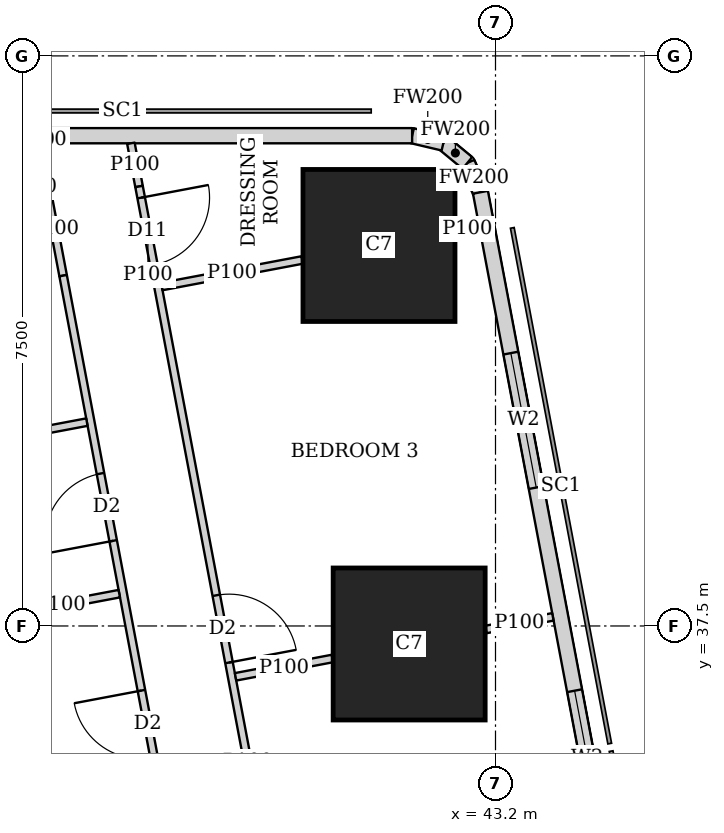
"""IFC4 building model, lengths in metres.
Left out: names, types, materials, properties, quantities, classifications, styles, units other than length and angle.
Written with IfcOpenShell. Run it as: python <this file> out.ifc"""

import sys

from ifc_helpers import new_model, si_unit, direction, frame, frame_2d, origin, origin_2d, place, context, subcontext, project, spatial, rectangle, extrude, element, fill, save


model = new_model("IFC4")
c1 = context("Model", 3, precision=1e-05, world=origin(), true_north=direction((0.0, 1.0)))
c2 = subcontext(c1, "Body", "Model", "MODEL_VIEW")
j1 = project(units=[si_unit("LENGTHUNIT", "METRE"), si_unit("PLANEANGLEUNIT", "RADIAN")], contexts=[c1])
p1 = place(None, origin())
s1 = spatial("IfcSite", under=j1, at=p1, CompositionType="ELEMENT")
p2 = place(p1, origin())
s2 = spatial("IfcBuilding", under=s1, at=p2, CompositionType="ELEMENT")
p3 = place(p2, frame((0.0, 0.0, 266.6)))
s3 = spatial("IfcBuildingStorey", under=s2, at=p3, CompositionType="ELEMENT", Elevation=266.6)
for number, where, z_axis, x_axis in (
    (1, (42.064, 37.263, 0.0), (0.0, 0.0, 1.0), (1.0, 0.0, 0.0)),
    (2, (41.667, 42.506, 0.0), (0.0, 0.0, 1.0), (1.0, 0.0, 0.0)),
):
    element("IfcColumn", number, at=place(p3, frame(where, z_axis=z_axis, x_axis=x_axis)), inside=s3, PredefinedType="COLUMN", context=c2, shape_type="SweptSolid", body=[
        extrude(rectangle(XDim=2.0, YDim=2.0, at=origin_2d()), origin(), (0.0, 0.0, 1.0), 3.75),
    ])
p4 = place(p3, frame((49.684, 7.832, 0.0), z_axis=(0.0, 0.0, 1.0), x_axis=(-0.185616669694, 0.982622232565, 0.0)))
e3 = element("IfcWall", 3, at=p4, inside=s3, PredefinedType="SOLIDWALL", context=c2, shape_type="SweptSolid", body=[
    extrude(rectangle(XDim=36.0, YDim=0.2, at=frame_2d((18.0, 0.0))), origin(), (0.0, 0.0, 1.0), 3.5),
])
p5 = place(p4, frame((2.518, 0.0, 0.9)))
e4 = element("IfcOpeningElement", 4, at=p5, cuts=e3, PredefinedType="OPENING", context=c2, shape_type="SweptSolid", body=[
    extrude(rectangle(XDim=2.4, YDim=1.5, at=frame_2d((1.2, 0.75))), frame((0.0, 0.11, 0.0), z_axis=(0.0, -1.0, 0.0), x_axis=(1.0, 0.0, 0.0)), (0.0, 0.0, 1.0), 0.22),
])
p6 = place(p4, frame((8.444, 0.0, 0.9)))
e5 = element("IfcOpeningElement", 5, at=p6, cuts=e3, PredefinedType="OPENING", context=c2, shape_type="SweptSolid", body=[
    extrude(rectangle(XDim=1.8, YDim=1.5, at=frame_2d((0.9, 0.75))), frame((0.0, 0.11, 0.0), z_axis=(0.0, -1.0, 0.0), x_axis=(1.0, 0.0, 0.0)), (0.0, 0.0, 1.0), 0.22),
])
p7 = place(p4, frame((12.261, 0.0, 0.9)))
e6 = element("IfcOpeningElement", 6, at=p7, cuts=e3, PredefinedType="OPENING", context=c2, shape_type="SweptSolid", body=[
    extrude(rectangle(XDim=1.8, YDim=1.5, at=frame_2d((0.9, 0.75))), frame((0.0, 0.11, 0.0), z_axis=(0.0, -1.0, 0.0), x_axis=(1.0, 0.0, 0.0)), (0.0, 0.0, 1.0), 0.22),
])
p8 = place(p4, frame((16.078, 0.0, 0.9)))
e7 = element("IfcOpeningElement", 7, at=p8, cuts=e3, PredefinedType="OPENING", context=c2, shape_type="SweptSolid", body=[
    extrude(rectangle(XDim=1.8, YDim=1.5, at=frame_2d((0.9, 0.75))), frame((0.0, 0.11, 0.0), z_axis=(0.0, -1.0, 0.0), x_axis=(1.0, 0.0, 0.0)), (0.0, 0.0, 1.0), 0.22),
])
p9 = place(p4, frame((19.894, 0.0, 0.9)))
e8 = element("IfcOpeningElement", 8, at=p9, cuts=e3, PredefinedType="OPENING", context=c2, shape_type="SweptSolid", body=[
    extrude(rectangle(XDim=1.8, YDim=1.5, at=frame_2d((0.9, 0.75))), frame((0.0, 0.11, 0.0), z_axis=(0.0, -1.0, 0.0), x_axis=(1.0, 0.0, 0.0)), (0.0, 0.0, 1.0), 0.22),
])
p10 = place(p4, frame((23.71, 0.0, 0.9)))
e9 = element("IfcOpeningElement", 9, at=p10, cuts=e3, PredefinedType="OPENING", context=c2, shape_type="SweptSolid", body=[
    extrude(rectangle(XDim=1.8, YDim=1.5, at=frame_2d((0.9, 0.75))), frame((0.0, 0.11, 0.0), z_axis=(0.0, -1.0, 0.0), x_axis=(1.0, 0.0, 0.0)), (0.0, 0.0, 1.0), 0.22),
])
p11 = place(p4, frame((27.526, 0.0, 0.9)))
e10 = element("IfcOpeningElement", 10, at=p11, cuts=e3, PredefinedType="OPENING", context=c2, shape_type="SweptSolid", body=[
    extrude(rectangle(XDim=1.8, YDim=1.5, at=frame_2d((0.9, 0.75))), frame((0.0, 0.11, 0.0), z_axis=(0.0, -1.0, 0.0), x_axis=(1.0, 0.0, 0.0)), (0.0, 0.0, 1.0), 0.22),
])
p12 = place(p4, frame((32.046, 0.0, 0.9)))
e11 = element("IfcOpeningElement", 11, at=p12, cuts=e3, PredefinedType="OPENING", context=c2, shape_type="SweptSolid", body=[
    extrude(rectangle(XDim=1.8, YDim=1.5, at=frame_2d((0.9, 0.75))), frame((0.0, 0.11, 0.0), z_axis=(0.0, -1.0, 0.0), x_axis=(1.0, 0.0, 0.0)), (0.0, 0.0, 1.0), 0.22),
])
p13 = place(p3, frame((43.002, 43.206, 0.0), z_axis=(0.0, 0.0, 1.0), x_axis=(-0.40678170573, 0.913525393124, 0.0)))
e12 = element("IfcWall", 12, at=p13, inside=s3, PredefinedType="SOLIDWALL", context=c2, shape_type="SweptSolid", body=[
    extrude(rectangle(XDim=0.423, YDim=0.2, at=frame_2d((0.211, 0.0))), origin(), (0.0, 0.0, 1.0), 3.5),
])
p14 = place(p3, frame((42.83, 43.592, 0.0), z_axis=(0.0, 0.0, 1.0), x_axis=(-0.771190539797, 0.636604391539, 0.0)))
e13 = element("IfcWall", 13, at=p14, inside=s3, PredefinedType="SOLIDWALL", context=c2, shape_type="SweptSolid", body=[
    extrude(rectangle(XDim=0.41, YDim=0.2, at=frame_2d((0.205, 0.0))), origin(), (0.0, 0.0, 1.0), 3.5),
])
p15 = place(p3, frame((42.514, 43.853, 0.0), z_axis=(0.0, 0.0, 1.0), x_axis=(-0.973288080424, 0.229587265555, 0.0)))
e14 = element("IfcWall", 14, at=p15, inside=s3, PredefinedType="SOLIDWALL", context=c2, shape_type="SweptSolid", body=[
    extrude(rectangle(XDim=0.422, YDim=0.2, at=frame_2d((0.211, 0.0))), origin(), (0.0, 0.0, 1.0), 3.5),
])
p16 = place(p3, frame((42.103, 43.95, 0.0), z_axis=(0.0, 0.0, 1.0), x_axis=(-1.0, 0.0, 0.0)))
e15 = element("IfcWall", 15, at=p16, inside=s3, PredefinedType="SOLIDWALL", context=c2, shape_type="SweptSolid", body=[
    extrude(rectangle(XDim=27.54, YDim=0.2, at=frame_2d((13.77, 0.0))), origin(), (0.0, 0.0, 1.0), 3.5),
])
p17 = place(p16, frame((10.603, 0.0, 0.9)))
e16 = element("IfcOpeningElement", 16, at=p17, cuts=e15, PredefinedType="OPENING", context=c2, shape_type="SweptSolid", body=[
    extrude(rectangle(XDim=1.8, YDim=1.5, at=frame_2d((0.9, 0.75))), frame((0.0, 0.11, 0.0), z_axis=(0.0, -1.0, 0.0), x_axis=(1.0, 0.0, 0.0)), (0.0, 0.0, 1.0), 0.22),
])
p18 = place(p16, frame((14.203, 0.0, 0.9)))
e17 = element("IfcOpeningElement", 17, at=p18, cuts=e15, PredefinedType="OPENING", context=c2, shape_type="SweptSolid", body=[
    extrude(rectangle(XDim=1.8, YDim=1.5, at=frame_2d((0.9, 0.75))), frame((0.0, 0.11, 0.0), z_axis=(0.0, -1.0, 0.0), x_axis=(1.0, 0.0, 0.0)), (0.0, 0.0, 1.0), 0.22),
])
p19 = place(p16, frame((17.803, 0.0, 0.9)))
e18 = element("IfcOpeningElement", 18, at=p19, cuts=e15, PredefinedType="OPENING", context=c2, shape_type="SweptSolid", body=[
    extrude(rectangle(XDim=1.8, YDim=1.5, at=frame_2d((0.9, 0.75))), frame((0.0, 0.11, 0.0), z_axis=(0.0, -1.0, 0.0), x_axis=(1.0, 0.0, 0.0)), (0.0, 0.0, 1.0), 0.22),
])
p20 = place(p16, frame((22.822, 0.0, 0.9)))
e19 = element("IfcOpeningElement", 19, at=p20, cuts=e15, PredefinedType="OPENING", context=c2, shape_type="SweptSolid", body=[
    extrude(rectangle(XDim=2.4, YDim=1.5, at=frame_2d((1.2, 0.75))), frame((0.0, 0.11, 0.0), z_axis=(0.0, -1.0, 0.0), x_axis=(1.0, 0.0, 0.0)), (0.0, 0.0, 1.0), 0.22),
])
p21 = place(p3, frame((34.036, 42.186, 0.0), z_axis=(0.0, 0.0, 1.0), x_axis=(0.185593518645, -0.9826266055, 0.0)))
e20 = element("IfcWall", 20, at=p21, inside=s3, PredefinedType="SOLIDWALL", context=c2, shape_type="SweptSolid", body=[
    extrude(rectangle(XDim=35.961, YDim=0.15, at=frame_2d((17.98, 0.0))), origin(), (0.0, 0.0, 1.0), 2.5),
])
p22 = place(p21, frame((15.529, 0.0, 0.0)))
e21 = element("IfcOpeningElement", 21, at=p22, cuts=e20, PredefinedType="OPENING", context=c2, shape_type="SweptSolid", body=[
    extrude(rectangle(XDim=1.0, YDim=2.1, at=frame_2d((0.5, 1.05))), frame((0.0, 0.085, 0.0), z_axis=(0.0, -1.0, 0.0), x_axis=(1.0, 0.0, 0.0)), (0.0, 0.0, 1.0), 0.17),
])
p23 = place(p21, frame((19.345, 0.0, 0.0)))
e22 = element("IfcOpeningElement", 22, at=p23, cuts=e20, PredefinedType="OPENING", context=c2, shape_type="SweptSolid", body=[
    extrude(rectangle(XDim=1.0, YDim=2.1, at=frame_2d((0.5, 1.05))), frame((0.0, 0.085, 0.0), z_axis=(0.0, -1.0, 0.0), x_axis=(1.0, 0.0, 0.0)), (0.0, 0.0, 1.0), 0.17),
])
p24 = place(p21, frame((30.594, 0.0, 0.0)))
e23 = element("IfcOpeningElement", 23, at=p24, cuts=e20, PredefinedType="OPENING", context=c2, shape_type="SweptSolid", body=[
    extrude(rectangle(XDim=1.0, YDim=2.1, at=frame_2d((0.5, 1.05))), frame((0.0, 0.085, 0.0), z_axis=(0.0, -1.0, 0.0), x_axis=(1.0, 0.0, 0.0)), (0.0, 0.0, 1.0), 0.17),
])
p25 = place(p3, frame((38.403, 43.85, 0.0), z_axis=(0.0, 0.0, 1.0), x_axis=(0.184976954078, -0.982742858768, 0.0)))
e24 = element("IfcWall", 24, at=p25, inside=s3, PredefinedType="PARTITIONING", context=c2, shape_type="SweptSolid", body=[
    extrude(rectangle(XDim=0.578, YDim=0.1, at=frame_2d((0.289, 0.0))), origin(), (0.0, 0.0, 1.0), 3.5),
])
p26 = place(p3, frame((38.51, 43.282, 0.0), z_axis=(0.0, 0.0, 1.0), x_axis=(0.185775287495, -0.982592256511, 0.0)))
e25 = element("IfcWall", 25, at=p26, inside=s3, PredefinedType="PARTITIONING", context=c2, shape_type="SweptSolid", body=[
    extrude(rectangle(XDim=1.259, YDim=0.1, at=frame_2d((0.629, 0.0))), origin(), (0.0, 0.0, 1.0), 2.05),
])
p27 = place(p26, frame((0.15, 0.0, 0.0)))
e26 = element("IfcOpeningElement", 26, at=p27, cuts=e25, PredefinedType="OPENING", context=c2, shape_type="SweptSolid", body=[
    extrude(rectangle(XDim=0.9, YDim=2.0, at=frame_2d((0.45, 1.0))), frame((0.0, 0.06, 0.0), z_axis=(0.0, -1.0, 0.0), x_axis=(1.0, 0.0, 0.0)), (0.0, 0.0, 1.0), 0.12),
])
p28 = place(p3, frame((38.744, 42.045, 0.0), z_axis=(0.0, 0.0, 1.0), x_axis=(0.185614085367, -0.982622720739, 0.0)))
e27 = element("IfcWall", 27, at=p28, inside=s3, PredefinedType="PARTITIONING", context=c2, shape_type="SweptSolid", body=[
    extrude(rectangle(XDim=12.898, YDim=0.1, at=frame_2d((6.449, 0.0))), origin(), (0.0, 0.0, 1.0), 2.5),
])
p29 = place(p28, frame((11.848, 0.0, 0.0)))
e28 = element("IfcOpeningElement", 28, at=p29, cuts=e27, PredefinedType="OPENING", context=c2, shape_type="SweptSolid", body=[
    extrude(rectangle(XDim=0.9, YDim=2.1, at=frame_2d((0.45, 1.05))), frame((0.0, 0.06, 0.0), z_axis=(0.0, -1.0, 0.0), x_axis=(1.0, 0.0, 0.0)), (0.0, 0.0, 1.0), 0.12),
])
p30 = place(p28, frame((8.191, 0.0, 0.0)))
e29 = element("IfcOpeningElement", 29, at=p30, cuts=e27, PredefinedType="OPENING", context=c2, shape_type="SweptSolid", body=[
    extrude(rectangle(XDim=0.9, YDim=2.1, at=frame_2d((0.45, 1.05))), frame((0.0, 0.06, 0.0), z_axis=(0.0, -1.0, 0.0), x_axis=(1.0, 0.0, 0.0)), (0.0, 0.0, 1.0), 0.12),
])
p31 = place(p28, frame((4.215, 0.0, 0.0)))
e30 = element("IfcOpeningElement", 30, at=p31, cuts=e27, PredefinedType="OPENING", context=c2, shape_type="SweptSolid", body=[
    extrude(rectangle(XDim=0.9, YDim=2.1, at=frame_2d((0.45, 1.05))), frame((0.0, 0.06, 0.0), z_axis=(0.0, -1.0, 0.0), x_axis=(1.0, 0.0, 0.0)), (0.0, 0.0, 1.0), 0.12),
])
p32 = place(p3, frame((37.277, 43.346, 0.0), z_axis=(0.0, 0.0, 1.0), x_axis=(0.185775287495, -0.982592256511, 0.0)))
e31 = element("IfcWall", 31, at=p32, inside=s3, PredefinedType="PARTITIONING", context=c2, shape_type="SweptSolid", body=[
    extrude(rectangle(XDim=1.259, YDim=0.1, at=frame_2d((0.629, 0.0))), origin(), (0.0, 0.0, 1.0), 2.05),
])
p33 = place(p3, frame((37.511, 42.109, 0.0), z_axis=(0.0, 0.0, 1.0), x_axis=(0.185550464988, -0.982634736279, 0.0)))
e32 = element("IfcWall", 32, at=p33, inside=s3, PredefinedType="PARTITIONING", context=c2, shape_type="SweptSolid", body=[
    extrude(rectangle(XDim=13.35, YDim=0.1, at=frame_2d((6.675, 0.0))), origin(), (0.0, 0.0, 1.0), 2.5),
])
p34 = place(p33, frame((11.845, 0.0, 0.0)))
e33 = element("IfcOpeningElement", 33, at=p34, cuts=e32, PredefinedType="OPENING", context=c2, shape_type="SweptSolid", body=[
    extrude(rectangle(XDim=0.9, YDim=2.1, at=frame_2d((0.45, 1.05))), frame((0.0, 0.06, 0.0), z_axis=(0.0, -1.0, 0.0), x_axis=(1.0, 0.0, 0.0)), (0.0, 0.0, 1.0), 0.12),
])
p35 = place(p33, frame((8.224, 0.0, 0.0)))
e34 = element("IfcOpeningElement", 34, at=p35, cuts=e32, PredefinedType="OPENING", context=c2, shape_type="SweptSolid", body=[
    extrude(rectangle(XDim=0.9, YDim=2.1, at=frame_2d((0.45, 1.05))), frame((0.0, 0.06, 0.0), z_axis=(0.0, -1.0, 0.0), x_axis=(1.0, 0.0, 0.0)), (0.0, 0.0, 1.0), 0.12),
])
p36 = place(p33, frame((2.65, 0.0, 0.0)))
e35 = element("IfcOpeningElement", 35, at=p36, cuts=e32, PredefinedType="OPENING", context=c2, shape_type="SweptSolid", body=[
    extrude(rectangle(XDim=0.9, YDim=2.1, at=frame_2d((0.45, 1.05))), frame((0.0, 0.06, 0.0), z_axis=(0.0, -1.0, 0.0), x_axis=(1.0, 0.0, 0.0)), (0.0, 0.0, 1.0), 0.12),
])
p37 = place(p33, frame((9.936, 0.0, 0.0)))
e36 = element("IfcOpeningElement", 36, at=p37, cuts=e32, PredefinedType="OPENING", context=c2, shape_type="SweptSolid", body=[
    extrude(rectangle(XDim=0.9, YDim=2.1, at=frame_2d((0.45, 1.05))), frame((0.0, 0.06, 0.0), z_axis=(0.0, -1.0, 0.0), x_axis=(1.0, 0.0, 0.0)), (0.0, 0.0, 1.0), 0.12),
])
p38 = place(p33, frame((5.555, 0.0, 0.0)))
e37 = element("IfcOpeningElement", 37, at=p38, cuts=e32, PredefinedType="OPENING", context=c2, shape_type="SweptSolid", body=[
    extrude(rectangle(XDim=0.9, YDim=2.1, at=frame_2d((0.45, 1.05))), frame((0.0, 0.06, 0.0), z_axis=(0.0, -1.0, 0.0), x_axis=(1.0, 0.0, 0.0)), (0.0, 0.0, 1.0), 0.12),
])
p39 = place(p3, frame((42.985, 42.755, 0.0), z_axis=(0.0, 0.0, 1.0), x_axis=(-0.98281924824, -0.184570651215, 0.0)))
e38 = element("IfcWall", 38, at=p39, inside=s3, PredefinedType="PARTITIONING", context=c2, shape_type="SweptSolid", body=[
    extrude(rectangle(XDim=0.313, YDim=0.1, at=frame_2d((0.157, 0.0))), origin(), (0.0, 0.0, 1.0), 3.5),
])
p40 = place(p3, frame((40.657, 42.315, 0.0), z_axis=(0.0, 0.0, 1.0), x_axis=(-0.982622785543, -0.185613742305, 0.0)))
e39 = element("IfcWall", 39, at=p40, inside=s3, PredefinedType="PARTITIONING", context=c2, shape_type="SweptSolid", body=[
    extrude(rectangle(XDim=1.88, YDim=0.1, at=frame_2d((0.94, 0.0))), origin(), (0.0, 0.0, 1.0), 2.05),
])
p41 = place(p3, frame((43.955, 37.62, 0.0), z_axis=(0.0, 0.0, 1.0), x_axis=(-0.982708424405, -0.18515980288, 0.0)))
e40 = element("IfcWall", 40, at=p41, inside=s3, PredefinedType="PARTITIONING", context=c2, shape_type="SweptSolid", body=[
    extrude(rectangle(XDim=0.897, YDim=0.1, at=frame_2d((0.448, 0.0))), origin(), (0.0, 0.0, 1.0), 3.5),
])
p42 = place(p3, frame((41.054, 37.072, 0.0), z_axis=(0.0, 0.0, 1.0), x_axis=(-0.982576752117, -0.185857273733, 0.0)))
e41 = element("IfcWall", 41, at=p42, inside=s3, PredefinedType="PARTITIONING", context=c2, shape_type="SweptSolid", body=[
    extrude(rectangle(XDim=1.297, YDim=0.1, at=frame_2d((0.648, 0.0))), origin(), (0.0, 0.0, 1.0), 3.5),
])
p43 = place(p3, frame((37.824, 40.182, 0.0), z_axis=(0.0, 0.0, 1.0), x_axis=(-0.982674977865, -0.185337227447, 0.0)))
e42 = element("IfcWall", 42, at=p43, inside=s3, PredefinedType="PARTITIONING", context=c2, shape_type="SweptSolid", body=[
    extrude(rectangle(XDim=3.275, YDim=0.1, at=frame_2d((1.637, 0.0))), origin(), (0.0, 0.0, 1.0), 3.5),
])
p44 = place(p3, frame((38.25, 37.925, 0.0), z_axis=(0.0, 0.0, 1.0), x_axis=(-0.982610209589, -0.185680305934, 0.0)))
e43 = element("IfcWall", 43, at=p44, inside=s3, PredefinedType="PARTITIONING", context=c2, shape_type="SweptSolid", body=[
    extrude(rectangle(XDim=1.567, YDim=0.1, at=frame_2d((0.784, 0.0))), origin(), (0.0, 0.0, 1.0), 3.5),
])
p45 = place(p11, origin())
e44 = element("IfcWindow", 44, at=p45, inside=s3, PartitioningType="SINGLE_PANEL", PredefinedType="WINDOW", context=c2, shape_type="SweptSolid", body=[
    extrude(rectangle(XDim=1.8, YDim=1.5, at=frame_2d((0.9, 0.75))), frame((0.0, 0.03, 0.0), z_axis=(0.0, -1.0, 0.0), x_axis=(1.0, 0.0, 0.0)), (0.0, 0.0, 1.0), 0.06),
])
fill(e10, e44)
p46 = place(p12, origin())
e45 = element("IfcWindow", 45, at=p46, inside=s3, PartitioningType="SINGLE_PANEL", PredefinedType="WINDOW", context=c2, shape_type="SweptSolid", body=[
    extrude(rectangle(XDim=1.8, YDim=1.5, at=frame_2d((0.9, 0.75))), frame((0.0, 0.03, 0.0), z_axis=(0.0, -1.0, 0.0), x_axis=(1.0, 0.0, 0.0)), (0.0, 0.0, 1.0), 0.06),
])
fill(e11, e45)
p47 = place(p27, origin())
e46 = element("IfcDoor", 46, at=p47, inside=s3, OperationType="SINGLE_SWING_LEFT", PredefinedType="DOOR", context=c2, shape_type="SweptSolid", body=[
    extrude(rectangle(XDim=0.9, YDim=2.0, at=frame_2d((0.45, 1.0))), frame((0.0, 0.025, 0.0), z_axis=(0.0, -1.0, 0.0), x_axis=(1.0, 0.0, 0.0)), (0.0, 0.0, 1.0), 0.05),
])
fill(e26, e46)
p48 = place(p31, origin())
e47 = element("IfcDoor", 47, at=p48, inside=s3, OperationType="SINGLE_SWING_RIGHT", PredefinedType="DOOR", context=c2, shape_type="SweptSolid", body=[
    extrude(rectangle(XDim=0.9, YDim=2.1, at=frame_2d((0.45, 1.05))), frame((0.0, 0.025, 0.0), z_axis=(0.0, -1.0, 0.0), x_axis=(1.0, 0.0, 0.0)), (0.0, 0.0, 1.0), 0.05),
])
fill(e30, e47)
p49 = place(p36, origin())
e48 = element("IfcDoor", 48, at=p49, inside=s3, OperationType="SINGLE_SWING_LEFT", PredefinedType="DOOR", context=c2, shape_type="SweptSolid", body=[
    extrude(rectangle(XDim=0.9, YDim=2.1, at=frame_2d((0.45, 1.05))), frame((0.0, 0.025, 0.0), z_axis=(0.0, -1.0, 0.0), x_axis=(1.0, 0.0, 0.0)), (0.0, 0.0, 1.0), 0.05),
])
fill(e35, e48)
p50 = place(p38, origin())
e49 = element("IfcDoor", 49, at=p50, inside=s3, OperationType="SINGLE_SWING_RIGHT", PredefinedType="DOOR", context=c2, shape_type="SweptSolid", body=[
    extrude(rectangle(XDim=0.9, YDim=2.1, at=frame_2d((0.45, 1.05))), frame((0.0, 0.025, 0.0), z_axis=(0.0, -1.0, 0.0), x_axis=(1.0, 0.0, 0.0)), (0.0, 0.0, 1.0), 0.05),
])
fill(e37, e49)
save(model, sys.argv[1])
